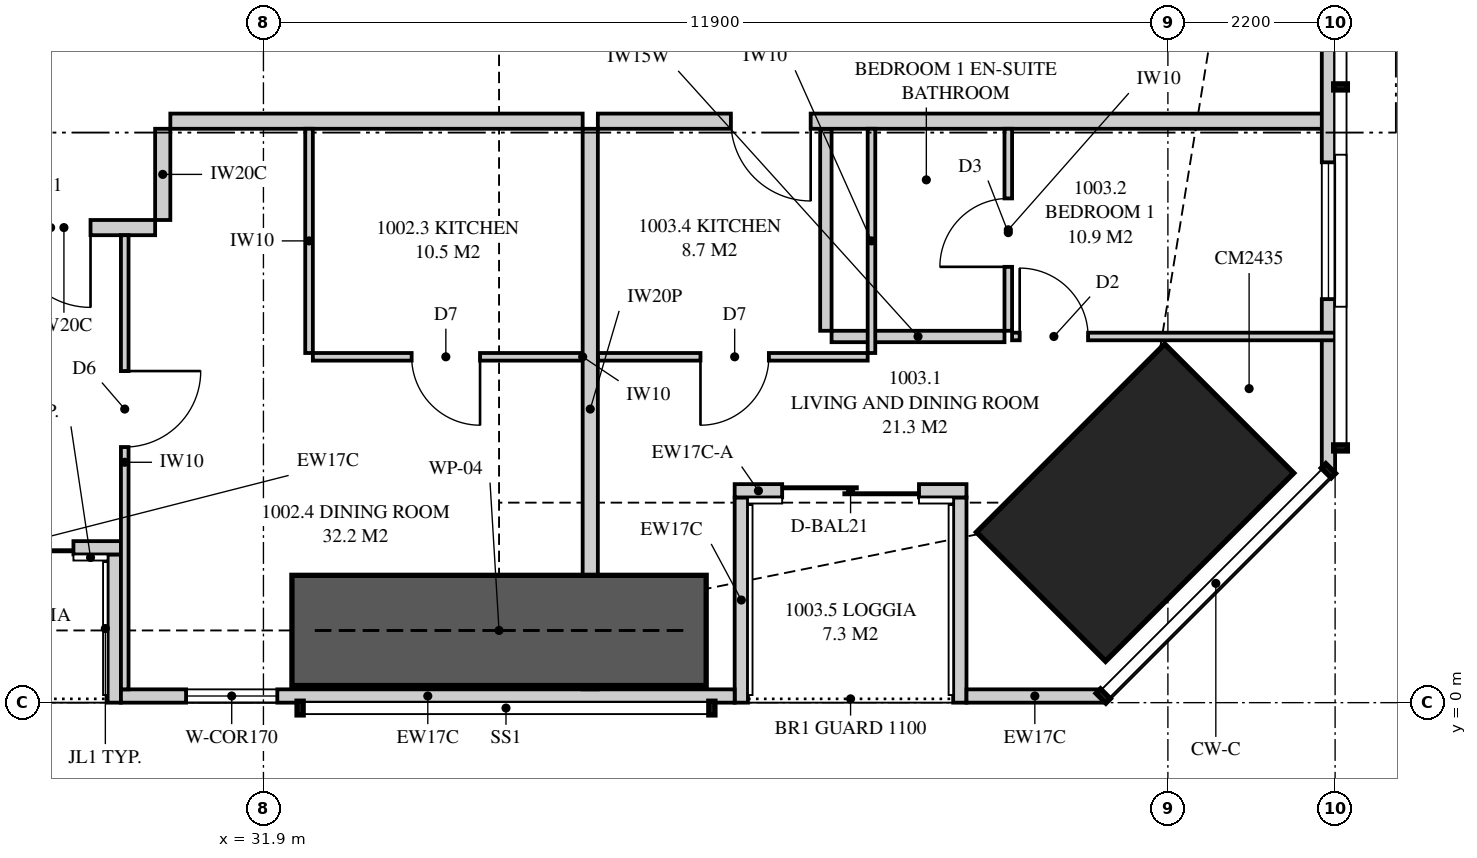
"""IFC4 building model, lengths in metres.
Left out: names, types, materials, properties, quantities, classifications, styles, units other than length and angle.
Written with IfcOpenShell. Run it as: python <this file> out.ifc"""

import sys

from ifc_helpers import new_model, si_unit, direction, frame, frame_2d, origin, origin_2d, place, context, subcontext, project, spatial, polyline, rectangle, outline, extrude, element, fill, save


model = new_model("IFC4")
c1 = context("Model", 3, precision=1e-05, world=origin(), true_north=direction((0.0, 1.0)))
c2 = subcontext(c1, "Body", "Model", "MODEL_VIEW")
j1 = project(units=[si_unit("LENGTHUNIT", "METRE"), si_unit("PLANEANGLEUNIT", "RADIAN")], contexts=[c1])
p1 = place(None, origin())
s1 = spatial("IfcSite", under=j1, at=p1, CompositionType="ELEMENT")
p2 = place(p1, origin())
s2 = spatial("IfcBuilding", under=s1, at=p2, CompositionType="ELEMENT")
p3 = place(p2, frame((0.0, 0.0, 41.1)))
s3 = spatial("IfcBuildingStorey", under=s2, at=p3, CompositionType="ELEMENT", Elevation=41.1)
p4 = place(p3, frame((43.369, 2.631, 0.0), z_axis=(0.0, 0.0, 1.0), x_axis=(-0.707106781187, 0.707106781187, 0.0)))
e1 = element("IfcColumn", 1, at=p4, inside=s3, PredefinedType="COLUMN", context=c2, shape_type="SweptSolid", body=[
    extrude(rectangle(XDim=2.4, YDim=3.5, at=origin_2d()), origin(), (0.0, 0.0, 1.0), 3.35),
])
p5 = place(p3, frame((30.025, 0.087, 0.0), z_axis=(0.0, 0.0, 1.0), x_axis=(1.0, 0.0, 0.0)))
e2 = element("IfcWall", 2, at=p5, inside=s3, PredefinedType="SOLIDWALL", context=c2, shape_type="SweptSolid", body=[
    extrude(outline(polyline([(0.0, 0.0), (8.075, 0.0), (8.075, 3.11), (5.179, 3.11), (5.179, 2.15), (5.131, 2.15), (5.131, 3.11), (4.975, 3.11), (4.975, 2.15), (0.0, 2.15), (0.0, 0.0)])), frame((0.0, 0.087, 0.0), z_axis=(0.0, -1.0, 0.0), x_axis=(1.0, 0.0, 0.0)), (0.0, 0.0, 1.0), 0.175),
])
p6 = place(p5, frame((0.857, 0.0, 0.4)))
e3 = element("IfcOpeningElement", 3, at=p6, cuts=e2, PredefinedType="OPENING", context=c2, shape_type="SweptSolid", body=[
    extrude(rectangle(XDim=1.2, YDim=1.7, at=frame_2d((0.6, 0.85))), frame((0.0, 0.097, 0.0), z_axis=(0.0, -1.0, 0.0), x_axis=(1.0, 0.0, 0.0)), (0.0, 0.0, 1.0), 0.195),
])
p7 = place(p3, frame((41.15, 0.087, 0.0), z_axis=(0.0, 0.0, 1.0), x_axis=(1.0, 0.0, 0.0)))
e4 = element("IfcWall", 4, at=p7, inside=s3, PredefinedType="SOLIDWALL", context=c2, shape_type="SweptSolid", body=[
    extrude(rectangle(XDim=1.799, YDim=0.175, at=frame_2d((0.899, 0.0))), origin(), (0.0, 0.0, 1.0), 3.11),
])
p8 = place(p3, frame((26.975, 2.038, 0.0), z_axis=(0.0, 0.0, 1.0), x_axis=(1.0, 0.0, 0.0)))
e5 = element("IfcWall", 5, at=p8, inside=s3, PredefinedType="SOLIDWALL", context=c2, shape_type="SweptSolid", body=[
    extrude(rectangle(XDim=3.05, YDim=0.175, at=frame_2d((1.525, 0.0))), origin(), (0.0, 0.0, 1.0), 3.11),
])
p9 = place(p8, frame((0.625, 0.0, 0.0)))
e6 = element("IfcOpeningElement", 6, at=p9, cuts=e5, PredefinedType="OPENING", context=c2, shape_type="SweptSolid", body=[
    extrude(rectangle(XDim=1.8, YDim=2.1, at=frame_2d((0.9, 1.05))), frame((0.0, 0.097, 0.0), z_axis=(0.0, -1.0, 0.0), x_axis=(1.0, 0.0, 0.0)), (0.0, 0.0, 1.0), 0.195),
])
p10 = place(p3, frame((29.938, 0.0, 0.0), z_axis=(0.0, 0.0, 1.0), x_axis=(0.0, 1.0, 0.0)))
e7 = element("IfcWall", 7, at=p10, inside=s3, PredefinedType="SOLIDWALL", context=c2, shape_type="SweptSolid", body=[
    extrude(outline(polyline([(0.0, 0.0), (1.95, 0.0), (1.95, 3.11), (1.75, 3.11), (1.75, 2.15), (0.15, 2.15), (0.15, 3.11), (0.0, 3.11), (0.0, 0.0)])), frame((0.0, 0.087, 0.0), z_axis=(0.0, -1.0, 0.0), x_axis=(1.0, 0.0, 0.0)), (0.0, 0.0, 1.0), 0.175),
])
p11 = place(p3, frame((38.1, 2.788, 0.0), z_axis=(0.0, 0.0, 1.0), x_axis=(1.0, 0.0, 0.0)))
e8 = element("IfcWall", 8, at=p11, inside=s3, PredefinedType="SOLIDWALL", context=c2, shape_type="SweptSolid", body=[
    extrude(rectangle(XDim=0.625, YDim=0.175, at=frame_2d((0.312, 0.0))), origin(), (0.0, 0.0, 1.0), 2.51),
])
p12 = place(p3, frame((38.725, 2.788, 0.0), z_axis=(0.0, 0.0, 1.0), x_axis=(1.0, 0.0, 0.0)))
e9 = element("IfcWall", 9, at=p12, inside=s3, PredefinedType="SOLIDWALL", context=c2, shape_type="SweptSolid", body=[
    extrude(rectangle(XDim=2.425, YDim=0.175, at=frame_2d((1.212, 0.0))), origin(), (0.0, 0.0, 1.0), 2.15),
])
p13 = place(p12, origin())
e10 = element("IfcOpeningElement", 10, at=p13, cuts=e9, PredefinedType="OPENING", context=c2, shape_type="SweptSolid", body=[
    extrude(rectangle(XDim=1.8, YDim=2.1, at=frame_2d((0.9, 1.05))), frame((0.0, 0.097, 0.0), z_axis=(0.0, -1.0, 0.0), x_axis=(1.0, 0.0, 0.0)), (0.0, 0.0, 1.0), 0.195),
])
p14 = place(p3, frame((38.188, 0.0, 0.0), z_axis=(0.0, 0.0, 1.0), x_axis=(0.0, 1.0, 0.0)))
e11 = element("IfcWall", 11, at=p14, inside=s3, PredefinedType="SOLIDWALL", context=c2, shape_type="SweptSolid", body=[
    extrude(outline(polyline([(0.0, 0.0), (2.7, 0.0), (2.7, 2.51), (2.424, 2.51), (2.424, 2.15), (0.757, 2.15), (0.757, 3.11), (0.0, 3.11), (0.0, 0.0)])), frame((0.0, 0.087, 0.0), z_axis=(0.0, -1.0, 0.0), x_axis=(1.0, 0.0, 0.0)), (0.0, 0.0, 1.0), 0.175),
])
p15 = place(p3, frame((41.062, 0.0, 0.0), z_axis=(0.0, 0.0, 1.0), x_axis=(0.0, 1.0, 0.0)))
e12 = element("IfcWall", 12, at=p15, inside=s3, PredefinedType="SOLIDWALL", context=c2, shape_type="SweptSolid", body=[
    extrude(outline(polyline([(0.0, 0.0), (2.7, 0.0), (2.7, 2.15), (1.334, 2.15), (1.334, 3.11), (0.0, 3.11), (0.0, 0.0)])), frame((0.0, 0.087, 0.0), z_axis=(0.0, -1.0, 0.0), x_axis=(1.0, 0.0, 0.0)), (0.0, 0.0, 1.0), 0.175),
])
p16 = place(p3, frame((45.913, 3.051, 0.0), z_axis=(0.0, 0.0, 1.0), x_axis=(0.0, 1.0, 0.0)))
e13 = element("IfcWall", 13, at=p16, inside=s3, PredefinedType="SOLIDWALL", context=c2, shape_type="SweptSolid", body=[
    extrude(outline(polyline([(0.0, 0.0), (31.897, 0.0), (31.897, 3.11), (22.167, 3.11), (22.167, 2.15), (22.074, 2.15), (22.074, 3.11), (21.949, 3.11), (21.949, 2.15), (9.949, 2.15), (9.949, 3.11), (9.823, 3.11), (9.823, 2.15), (9.73, 2.15), (9.73, 3.11), (0.0, 3.11), (0.0, 0.0)])), frame((0.0, 0.087, 0.0), z_axis=(0.0, -1.0, 0.0), x_axis=(1.0, 0.0, 0.0)), (0.0, 0.0, 1.0), 0.175),
])
p17 = place(p16, frame((2.257, 0.0, 0.4)))
e14 = element("IfcOpeningElement", 14, at=p17, cuts=e13, PredefinedType="OPENING", context=c2, shape_type="SweptSolid", body=[
    extrude(rectangle(XDim=1.8, YDim=1.7, at=frame_2d((0.9, 0.85))), frame((0.0, 0.097, 0.0), z_axis=(0.0, -1.0, 0.0), x_axis=(1.0, 0.0, 0.0)), (0.0, 0.0, 1.0), 0.195),
])
p18 = place(p16, frame((14.849, 0.0, 0.4)))
e15 = element("IfcOpeningElement", 15, at=p18, cuts=e13, PredefinedType="OPENING", context=c2, shape_type="SweptSolid", body=[
    extrude(rectangle(XDim=1.2, YDim=1.7, at=frame_2d((0.6, 0.85))), frame((0.0, 0.097, 0.0), z_axis=(0.0, -1.0, 0.0), x_axis=(1.0, 0.0, 0.0)), (0.0, 0.0, 1.0), 0.195),
])
p19 = place(p16, frame((27.34, 0.0, 0.4)))
e16 = element("IfcOpeningElement", 16, at=p19, cuts=e13, PredefinedType="OPENING", context=c2, shape_type="SweptSolid", body=[
    extrude(rectangle(XDim=1.8, YDim=1.7, at=frame_2d((0.9, 0.85))), frame((0.0, 0.097, 0.0), z_axis=(0.0, -1.0, 0.0), x_axis=(1.0, 0.0, 0.0)), (0.0, 0.0, 1.0), 0.195),
])
p20 = place(p3, frame((36.2, 0.175, 0.0), z_axis=(0.0, 0.0, 1.0), x_axis=(0.0, 1.0, 0.0)))
e17 = element("IfcWall", 17, at=p20, inside=s3, PredefinedType="PARTITIONING", context=c2, shape_type="SweptSolid", body=[
    extrude(outline(polyline([(0.088, 3.11), (0.0, 3.11), (0.0, 0.0), (0.529, 0.0), (0.529, 0.677), (1.021, 0.677), (1.021, 0.0), (7.375, 0.0), (7.375, 3.11), (3.766, 3.11), (3.766, 2.51), (1.944, 2.51), (1.944, 2.15), (1.021, 2.15), (1.021, 1.473), (0.529, 1.473), (0.529, 2.15), (0.088, 2.15), (0.088, 3.11)])), frame((0.0, 0.1, 0.0), z_axis=(0.0, -1.0, 0.0), x_axis=(1.0, 0.0, 0.0)), (0.0, 0.0, 1.0), 0.2),
])
p21 = place(p3, frame((32.55, 4.55, 0.0), z_axis=(0.0, 0.0, 1.0), x_axis=(1.0, 0.0, 0.0)))
e18 = element("IfcWall", 18, at=p21, inside=s3, PredefinedType="PARTITIONING", context=c2, shape_type="SweptSolid", body=[
    extrude(outline(polyline([(0.0, 0.0), (3.55, 0.0), (3.55, 3.11), (2.737, 3.11), (2.737, 2.541), (2.163, 2.541), (2.163, 3.11), (0.0, 3.11), (0.0, 0.0)])), frame((0.0, 0.05, 0.0), z_axis=(0.0, -1.0, 0.0), x_axis=(1.0, 0.0, 0.0)), (0.0, 0.0, 1.0), 0.1),
])
p22 = place(p21, frame((1.3, 0.0, 0.0)))
e19 = element("IfcOpeningElement", 19, at=p22, cuts=e18, PredefinedType="OPENING", context=c2, shape_type="SweptSolid", body=[
    extrude(rectangle(XDim=0.9, YDim=2.1, at=frame_2d((0.45, 1.05))), frame((0.0, 0.06, 0.0), z_axis=(0.0, -1.0, 0.0), x_axis=(1.0, 0.0, 0.0)), (0.0, 0.0, 1.0), 0.12),
])
p23 = place(p3, frame((32.5, 4.6, 0.0), z_axis=(0.0, 0.0, 1.0), x_axis=(0.0, 1.0, 0.0)))
e20 = element("IfcWall", 20, at=p23, inside=s3, PredefinedType="PARTITIONING", context=c2, shape_type="SweptSolid", body=[
    extrude(rectangle(XDim=2.95, YDim=0.1, at=frame_2d((1.475, 0.0))), origin(), (0.0, 0.0, 1.0), 3.11),
])
p24 = place(p3, frame((30.075, 0.175, 0.0), z_axis=(0.0, 0.0, 1.0), x_axis=(0.0, 1.0, 0.0)))
e21 = element("IfcWall", 21, at=p24, inside=s3, PredefinedType="PARTITIONING", context=c2, shape_type="SweptSolid", body=[
    extrude(outline(polyline([(0.0, 0.0), (5.975, 0.0), (5.975, 3.11), (1.635, 3.11), (1.635, 2.15), (0.0, 2.15), (0.0, 3.11), (0.0, 0.0)])), frame((0.0, 0.05, 0.0), z_axis=(0.0, -1.0, 0.0), x_axis=(1.0, 0.0, 0.0)), (0.0, 0.0, 1.0), 0.1),
])
p25 = place(p24, frame((3.188, 0.0, 0.0)))
e22 = element("IfcOpeningElement", 22, at=p25, cuts=e21, PredefinedType="OPENING", context=c2, shape_type="SweptSolid", body=[
    extrude(rectangle(XDim=1.0, YDim=2.1, at=frame_2d((0.5, 1.05))), frame((0.0, 0.06, 0.0), z_axis=(0.0, -1.0, 0.0), x_axis=(1.0, 0.0, 0.0)), (0.0, 0.0, 1.0), 0.12),
])
p26 = place(p3, frame((36.3, 7.65, 0.0), z_axis=(0.0, 0.0, 1.0), x_axis=(1.0, 0.0, 0.0)))
e23 = element("IfcWall", 23, at=p26, inside=s3, PredefinedType="PARTITIONING", context=c2, shape_type="SweptSolid", body=[
    extrude(outline(polyline([(0.0, 0.0), (9.7, 0.0), (9.7, 3.11), (8.804, 3.11), (8.804, 2.15), (6.96, 2.15), (6.96, 3.11), (0.0, 3.11), (0.0, 0.0)])), frame((0.0, 0.1, 0.0), z_axis=(0.0, -1.0, 0.0), x_axis=(1.0, 0.0, 0.0)), (0.0, 0.0, 1.0), 0.2),
])
p27 = place(p26, frame((1.75, 0.0, 0.0)))
e24 = element("IfcOpeningElement", 24, at=p27, cuts=e23, PredefinedType="OPENING", context=c2, shape_type="SweptSolid", body=[
    extrude(rectangle(XDim=1.05, YDim=2.2, at=frame_2d((0.525, 1.1))), frame((0.0, 0.11, 0.0), z_axis=(0.0, -1.0, 0.0), x_axis=(1.0, 0.0, 0.0)), (0.0, 0.0, 1.0), 0.22),
])
p28 = place(p3, frame((41.7, 4.892, 0.0), z_axis=(0.0, 0.0, 1.0), x_axis=(0.0, 1.0, 0.0)))
e25 = element("IfcWall", 25, at=p28, inside=s3, PredefinedType="PARTITIONING", context=c2, shape_type="SweptSolid", body=[
    extrude(rectangle(XDim=2.658, YDim=0.1, at=frame_2d((1.329, 0.0))), origin(), (0.0, 0.0, 1.0), 3.11),
])
p29 = place(p28, frame((0.841, 0.0, 0.0)))
e26 = element("IfcOpeningElement", 26, at=p29, cuts=e25, PredefinedType="OPENING", context=c2, shape_type="SweptSolid", body=[
    extrude(rectangle(XDim=0.9, YDim=2.1, at=frame_2d((0.45, 1.05))), frame((0.0, 0.06, 0.0), z_axis=(0.0, -1.0, 0.0), x_axis=(1.0, 0.0, 0.0)), (0.0, 0.0, 1.0), 0.12),
])
p30 = place(p3, frame((41.75, 4.817, 0.0), z_axis=(0.0, 0.0, 1.0), x_axis=(1.0, 0.0, 0.0)))
e27 = element("IfcWall", 27, at=p30, inside=s3, PredefinedType="PARTITIONING", context=c2, shape_type="SweptSolid", body=[
    extrude(outline(polyline([(0.0, 0.0), (4.25, 0.0), (4.25, 3.11), (2.844, 3.11), (2.844, 2.15), (1.102, 2.15), (1.102, 3.11), (0.0, 3.11), (0.0, 0.0)])), frame((0.0, 0.05, 0.0), z_axis=(0.0, -1.0, 0.0), x_axis=(1.0, 0.0, 0.0)), (0.0, 0.0, 1.0), 0.1),
])
p31 = place(p30, frame((0.1, 0.0, 0.0)))
e28 = element("IfcOpeningElement", 28, at=p31, cuts=e27, PredefinedType="OPENING", context=c2, shape_type="SweptSolid", body=[
    extrude(rectangle(XDim=0.9, YDim=2.1, at=frame_2d((0.45, 1.05))), frame((0.0, 0.06, 0.0), z_axis=(0.0, -1.0, 0.0), x_axis=(1.0, 0.0, 0.0)), (0.0, 0.0, 1.0), 0.12),
])
p32 = place(p3, frame((39.375, 4.817, 0.0), z_axis=(0.0, 0.0, 1.0), x_axis=(1.0, 0.0, 0.0)))
e29 = element("IfcWall", 29, at=p32, inside=s3, PredefinedType="PLUMBINGWALL", context=c2, shape_type="SweptSolid", body=[
    extrude(rectangle(XDim=2.275, YDim=0.15, at=frame_2d((1.137, 0.0))), origin(), (0.0, 0.0, 1.0), 3.11),
])
p33 = place(p3, frame((39.3, 4.892, 0.0), z_axis=(0.0, 0.0, 1.0), x_axis=(0.0, 1.0, 0.0)))
e30 = element("IfcWall", 30, at=p33, inside=s3, PredefinedType="PLUMBINGWALL", context=c2, shape_type="SweptSolid", body=[
    extrude(rectangle(XDim=2.658, YDim=0.15, at=frame_2d((1.329, 0.0))), origin(), (0.0, 0.0, 1.0), 3.11),
])
p34 = place(p3, frame((36.3, 4.55, 0.0), z_axis=(0.0, 0.0, 1.0), x_axis=(1.0, 0.0, 0.0)))
e31 = element("IfcWall", 31, at=p34, inside=s3, PredefinedType="PARTITIONING", context=c2, shape_type="SweptSolid", body=[
    extrude(rectangle(XDim=3.55, YDim=0.1, at=frame_2d((1.775, 0.0))), origin(), (0.0, 0.0, 1.0), 3.11),
])
p35 = place(p34, frame((1.35, 0.0, 0.0)))
e32 = element("IfcOpeningElement", 32, at=p35, cuts=e31, PredefinedType="OPENING", context=c2, shape_type="SweptSolid", body=[
    extrude(rectangle(XDim=0.9, YDim=2.1, at=frame_2d((0.45, 1.05))), frame((0.0, 0.06, 0.0), z_axis=(0.0, -1.0, 0.0), x_axis=(1.0, 0.0, 0.0)), (0.0, 0.0, 1.0), 0.12),
])
p36 = place(p3, frame((39.9, 4.6, 0.0), z_axis=(0.0, 0.0, 1.0), x_axis=(0.0, 1.0, 0.0)))
e33 = element("IfcWall", 33, at=p36, inside=s3, PredefinedType="PARTITIONING", context=c2, shape_type="SweptSolid", body=[
    extrude(rectangle(XDim=2.95, YDim=0.1, at=frame_2d((1.475, 0.0))), origin(), (0.0, 0.0, 1.0), 3.11),
])
p37 = place(p3, frame((30.675, 7.65, 0.0), z_axis=(0.0, 0.0, 1.0), x_axis=(1.0, 0.0, 0.0)))
e34 = element("IfcWall", 34, at=p37, inside=s3, PredefinedType="PARTITIONING", context=c2, shape_type="SweptSolid", body=[
    extrude(outline(polyline([(0.0, 0.0), (5.425, 0.0), (5.425, 3.11), (4.662, 3.11), (4.662, 2.541), (3.988, 2.541), (3.988, 3.11), (0.0, 3.11), (0.0, 0.0)])), frame((0.0, 0.1, 0.0), z_axis=(0.0, -1.0, 0.0), x_axis=(1.0, 0.0, 0.0)), (0.0, 0.0, 1.0), 0.2),
])
p38 = place(p3, frame((28.075, 6.25, 0.0), z_axis=(0.0, 0.0, 1.0), x_axis=(1.0, 0.0, 0.0)))
e35 = element("IfcWall", 35, at=p38, inside=s3, PredefinedType="PARTITIONING", context=c2, shape_type="SweptSolid", body=[
    extrude(rectangle(XDim=2.4, YDim=0.2, at=frame_2d((1.2, 0.0))), origin(), (0.0, 0.0, 1.0), 3.11),
])
p39 = place(p38, frame((0.5, 0.0, 0.0)))
e36 = element("IfcOpeningElement", 36, at=p39, cuts=e35, PredefinedType="OPENING", context=c2, shape_type="SweptSolid", body=[
    extrude(rectangle(XDim=1.05, YDim=2.2, at=frame_2d((0.525, 1.1))), frame((0.0, 0.11, 0.0), z_axis=(0.0, -1.0, 0.0), x_axis=(1.0, 0.0, 0.0)), (0.0, 0.0, 1.0), 0.22),
])
p40 = place(p3, frame((30.575, 7.55, 0.0), z_axis=(0.0, 0.0, 1.0), x_axis=(0.0, -1.0, 0.0)))
e37 = element("IfcWall", 37, at=p40, inside=s3, PredefinedType="PARTITIONING", context=c2, shape_type="SweptSolid", body=[
    extrude(rectangle(XDim=1.2, YDim=0.2, at=frame_2d((0.6, 0.0))), origin(), (0.0, 0.0, 1.0), 3.11),
])
p41 = place(p3, frame((32.275, 0.95, 0.0), z_axis=(0.0, 0.0, 1.0), x_axis=(1.0, 0.0, 0.0)))
e38 = element("IfcWall", 38, at=p41, inside=s3, PredefinedType="SHEAR", context=c2, shape_type="SweptSolid", body=[
    extrude(rectangle(XDim=5.45, YDim=1.45, at=frame_2d((2.725, 0.0))), origin(), (0.0, 0.0, 1.0), 3.35),
])
p42 = place(p9, origin())
e39 = element("IfcDoor", 39, at=p42, inside=s3, OperationType="SLIDING_TO_LEFT", PredefinedType="DOOR", context=c2, shape_type="SweptSolid", body=[
    extrude(rectangle(XDim=1.8, YDim=2.1, at=frame_2d((0.9, 1.05))), frame((0.0, 0.025, 0.0), z_axis=(0.0, -1.0, 0.0), x_axis=(1.0, 0.0, 0.0)), (0.0, 0.0, 1.0), 0.05),
])
fill(e6, e39)
p43 = place(p6, origin())
e40 = element("IfcWindow", 40, at=p43, inside=s3, PartitioningType="SINGLE_PANEL", PredefinedType="WINDOW", context=c2, shape_type="SweptSolid", body=[
    extrude(rectangle(XDim=1.2, YDim=1.7, at=frame_2d((0.6, 0.85))), frame((0.0, 0.03, 0.0), z_axis=(0.0, -1.0, 0.0), x_axis=(1.0, 0.0, 0.0)), (0.0, 0.0, 1.0), 0.06),
])
fill(e3, e40)
p44 = place(p13, origin())
e41 = element("IfcDoor", 41, at=p44, inside=s3, OperationType="SLIDING_TO_LEFT", PredefinedType="DOOR", context=c2, shape_type="SweptSolid", body=[
    extrude(rectangle(XDim=1.8, YDim=2.1, at=frame_2d((0.9, 1.05))), frame((0.0, 0.025, 0.0), z_axis=(0.0, -1.0, 0.0), x_axis=(1.0, 0.0, 0.0)), (0.0, 0.0, 1.0), 0.05),
])
fill(e10, e41)
p45 = place(p17, origin())
e42 = element("IfcWindow", 42, at=p45, inside=s3, PartitioningType="SINGLE_PANEL", PredefinedType="WINDOW", context=c2, shape_type="SweptSolid", body=[
    extrude(rectangle(XDim=1.8, YDim=1.7, at=frame_2d((0.9, 0.85))), frame((0.0, 0.03, 0.0), z_axis=(0.0, -1.0, 0.0), x_axis=(1.0, 0.0, 0.0)), (0.0, 0.0, 1.0), 0.06),
])
fill(e14, e42)
p46 = place(p39, frame((1.05, 0.0, 0.0), z_axis=(0.0, 0.0, 1.0), x_axis=(-1.0, 0.0, 0.0)))
e43 = element("IfcDoor", 43, at=p46, inside=s3, OperationType="SINGLE_SWING_LEFT", PredefinedType="DOOR", context=c2, shape_type="SweptSolid", body=[
    extrude(rectangle(XDim=1.05, YDim=2.2, at=frame_2d((0.525, 1.1))), frame((0.0, 0.025, 0.0), z_axis=(0.0, -1.0, 0.0), x_axis=(1.0, 0.0, 0.0)), (0.0, 0.0, 1.0), 0.05),
])
fill(e36, e43)
p47 = place(p22, frame((0.9, 0.0, 0.0), z_axis=(0.0, 0.0, 1.0), x_axis=(-1.0, 0.0, 0.0)))
e44 = element("IfcDoor", 44, at=p47, inside=s3, OperationType="SINGLE_SWING_LEFT", PredefinedType="DOOR", context=c2, shape_type="SweptSolid", body=[
    extrude(rectangle(XDim=0.9, YDim=2.1, at=frame_2d((0.45, 1.05))), frame((0.0, 0.025, 0.0), z_axis=(0.0, -1.0, 0.0), x_axis=(1.0, 0.0, 0.0)), (0.0, 0.0, 1.0), 0.05),
])
fill(e19, e44)
p48 = place(p25, frame((1.0, 0.0, 0.0), z_axis=(0.0, 0.0, 1.0), x_axis=(-1.0, 0.0, 0.0)))
e45 = element("IfcDoor", 45, at=p48, inside=s3, OperationType="SINGLE_SWING_LEFT", PredefinedType="DOOR", context=c2, shape_type="SweptSolid", body=[
    extrude(rectangle(XDim=1.0, YDim=2.1, at=frame_2d((0.5, 1.05))), frame((0.0, 0.025, 0.0), z_axis=(0.0, -1.0, 0.0), x_axis=(1.0, 0.0, 0.0)), (0.0, 0.0, 1.0), 0.05),
])
fill(e22, e45)
p49 = place(p27, frame((1.05, 0.0, 0.0), z_axis=(0.0, 0.0, 1.0), x_axis=(-1.0, 0.0, 0.0)))
e46 = element("IfcDoor", 46, at=p49, inside=s3, OperationType="SINGLE_SWING_LEFT", PredefinedType="DOOR", context=c2, shape_type="SweptSolid", body=[
    extrude(rectangle(XDim=1.05, YDim=2.2, at=frame_2d((0.525, 1.1))), frame((0.0, 0.025, 0.0), z_axis=(0.0, -1.0, 0.0), x_axis=(1.0, 0.0, 0.0)), (0.0, 0.0, 1.0), 0.05),
])
fill(e24, e46)
p50 = place(p31, origin())
e47 = element("IfcDoor", 47, at=p50, inside=s3, OperationType="SINGLE_SWING_LEFT", PredefinedType="DOOR", context=c2, shape_type="SweptSolid", body=[
    extrude(rectangle(XDim=0.9, YDim=2.1, at=frame_2d((0.45, 1.05))), frame((0.0, 0.025, 0.0), z_axis=(0.0, -1.0, 0.0), x_axis=(1.0, 0.0, 0.0)), (0.0, 0.0, 1.0), 0.05),
])
fill(e28, e47)
p51 = place(p29, origin())
e48 = element("IfcDoor", 48, at=p51, inside=s3, OperationType="SINGLE_SWING_LEFT", PredefinedType="DOOR", context=c2, shape_type="SweptSolid", body=[
    extrude(rectangle(XDim=0.9, YDim=2.1, at=frame_2d((0.45, 1.05))), frame((0.0, 0.025, 0.0), z_axis=(0.0, -1.0, 0.0), x_axis=(1.0, 0.0, 0.0)), (0.0, 0.0, 1.0), 0.05),
])
fill(e26, e48)
p52 = place(p35, frame((0.9, 0.0, 0.0), z_axis=(0.0, 0.0, 1.0), x_axis=(-1.0, 0.0, 0.0)))
e49 = element("IfcDoor", 49, at=p52, inside=s3, OperationType="SINGLE_SWING_RIGHT", PredefinedType="DOOR", context=c2, shape_type="SweptSolid", body=[
    extrude(rectangle(XDim=0.9, YDim=2.1, at=frame_2d((0.45, 1.05))), frame((0.0, 0.025, 0.0), z_axis=(0.0, -1.0, 0.0), x_axis=(1.0, 0.0, 0.0)), (0.0, 0.0, 1.0), 0.05),
])
fill(e32, e49)
save(model, sys.argv[1])
